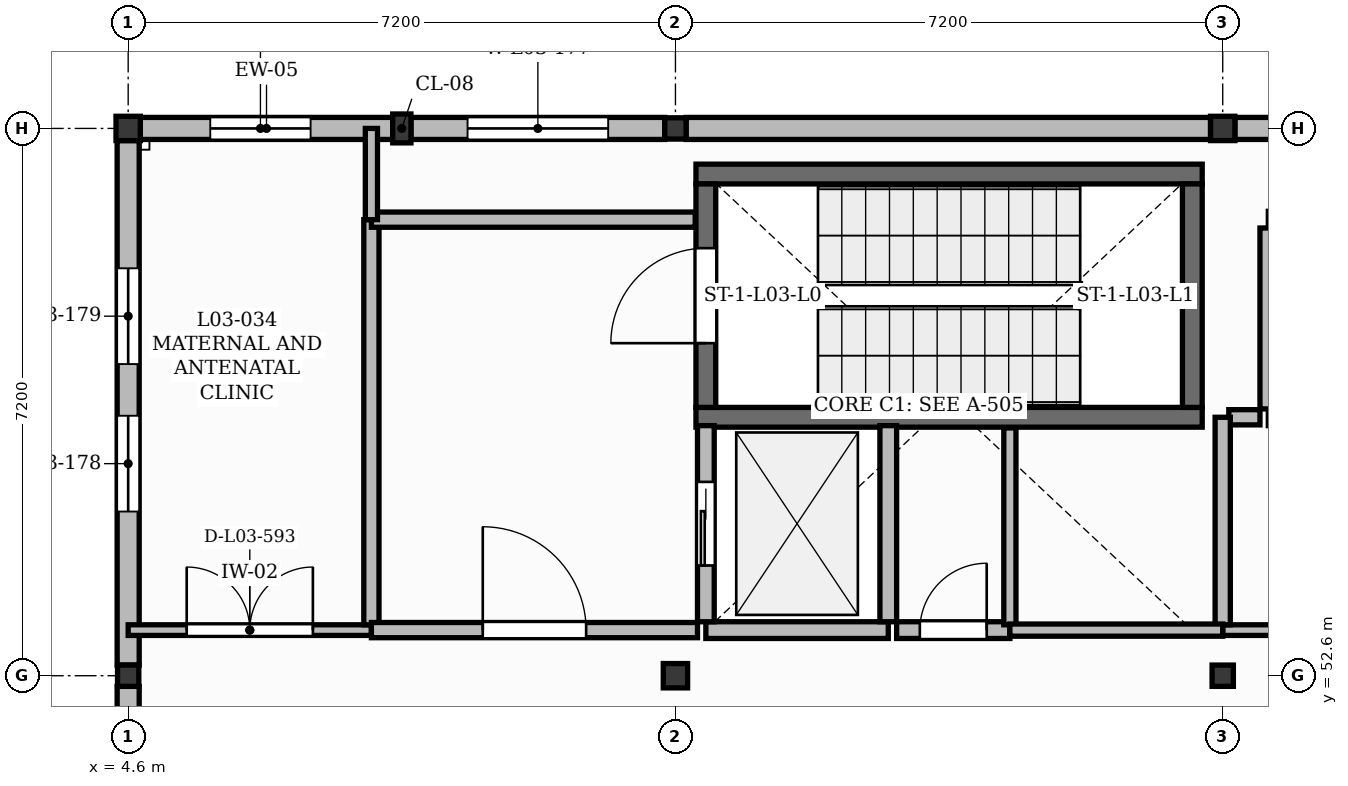
"""IFC4 building model, lengths in metres.
Left out: names, types, materials, properties, quantities, classifications, styles, units other than length and angle.
Written with IfcOpenShell. Run it as: python <this file> out.ifc"""

import sys

from ifc_helpers import new_model, si_unit, direction, frame, frame_2d, origin, origin_2d, place, context, subcontext, project, spatial, rectangle, extrude, element, fill, save


model = new_model("IFC4")
c1 = context("Model", 3, precision=1e-05, world=origin(), true_north=direction((0.0, 1.0)))
c2 = subcontext(c1, "Body", "Model", "MODEL_VIEW")
j1 = project(units=[si_unit("LENGTHUNIT", "METRE"), si_unit("PLANEANGLEUNIT", "RADIAN")], contexts=[c1])
p1 = place(None, origin())
s1 = spatial("IfcSite", under=j1, at=p1, CompositionType="ELEMENT")
p2 = place(p1, origin())
s2 = spatial("IfcBuilding", under=s1, at=p2, CompositionType="ELEMENT")
p3 = place(p2, frame((0.0, 0.0, 13.2)))
s3 = spatial("IfcBuildingStorey", under=s2, at=p3, CompositionType="ELEMENT", Elevation=13.2)
p4 = place(p3, frame((4.6, 52.6, 0.0), z_axis=(0.0, 0.0, 1.0), x_axis=(1.0, 0.0, 0.0)))
e1 = element("IfcColumn", 1, at=p4, inside=s3, PredefinedType="COLUMN", context=c2, shape_type="SweptSolid", body=[
    extrude(rectangle(XDim=0.28, YDim=0.28, at=origin_2d()), origin(), (0.0, 0.0, 1.0), 4.01),
])
for number, where, z_axis, x_axis in (
    (2, (4.6, 59.8, 0.0), (0.0, 0.0, 1.0), (1.0, 0.0, 0.0)),
    (3, (11.8, 52.6, 0.0), (0.0, 0.0, 1.0), (1.0, 0.0, 0.0)),
):
    element("IfcColumn", number, at=place(p3, frame(where, z_axis=z_axis, x_axis=x_axis)), inside=s3, PredefinedType="COLUMN", context=c2, shape_type="SweptSolid", body=[
        extrude(rectangle(XDim=0.32, YDim=0.32, at=origin_2d()), origin(), (0.0, 0.0, 1.0), 4.01),
    ])
for number, where, z_axis, x_axis in (
    (4, (11.8, 59.8, 0.0), (0.0, 0.0, 1.0), (1.0, 0.0, 0.0)),
    (5, (19.0, 52.6, 0.0), (0.0, 0.0, 1.0), (1.0, 0.0, 0.0)),
):
    element("IfcColumn", number, at=place(p3, frame(where, z_axis=z_axis, x_axis=x_axis)), inside=s3, PredefinedType="COLUMN", context=c2, shape_type="SweptSolid", body=[
        extrude(rectangle(XDim=0.28, YDim=0.28, at=origin_2d()), origin(), (0.0, 0.0, 1.0), 4.01),
    ])
p5 = place(p3, frame((19.0, 59.8, 0.0), z_axis=(0.0, 0.0, 1.0), x_axis=(1.0, 0.0, 0.0)))
e6 = element("IfcColumn", 6, at=p5, inside=s3, PredefinedType="COLUMN", context=c2, shape_type="SweptSolid", body=[
    extrude(rectangle(XDim=0.32, YDim=0.32, at=origin_2d()), origin(), (0.0, 0.0, 1.0), 4.01),
])
p6 = place(p3, frame((8.2, 59.8, 0.0), z_axis=(0.0, 0.0, 1.0), x_axis=(1.0, 0.0, 0.0)))
e7 = element("IfcColumn", 7, at=p6, inside=s3, PredefinedType="PILASTER", context=c2, shape_type="SweptSolid", body=[
    extrude(rectangle(XDim=0.24, YDim=0.38, at=origin_2d()), origin(), (0.0, 0.0, 1.0), 4.01),
])
p7 = place(p3, frame((4.6, 45.56, 0.0), z_axis=(0.0, 0.0, 1.0), x_axis=(0.0, 1.0, 0.0)))
e8 = element("IfcWall", 8, at=p7, inside=s3, PredefinedType="SOLIDWALL", context=c2, shape_type="SweptSolid", body=[
    extrude(rectangle(XDim=6.9, YDim=0.29, at=frame_2d((3.45, 0.0))), origin(), (0.0, 0.0, 1.0), 3.52),
])
p8 = place(p7, frame((1.61, 0.0, 1.0)))
e9 = element("IfcOpeningElement", 9, at=p8, cuts=e8, PredefinedType="OPENING", context=c2, shape_type="SweptSolid", body=[
    extrude(rectangle(XDim=1.94, YDim=1.8, at=frame_2d((0.97, 0.9))), frame((0.0, 0.155, 0.0), z_axis=(0.0, -1.0, 0.0), x_axis=(1.0, 0.0, 0.0)), (0.0, 0.0, 1.0), 0.31),
])
p9 = place(p3, frame((4.76, 59.8, 0.0), z_axis=(0.0, 0.0, 1.0), x_axis=(1.0, 0.0, 0.0)))
e10 = element("IfcWall", 10, at=p9, inside=s3, PredefinedType="SOLIDWALL", context=c2, shape_type="SweptSolid", body=[
    extrude(rectangle(XDim=3.32, YDim=0.29, at=frame_2d((1.66, 0.0))), origin(), (0.0, 0.0, 1.0), 3.55),
])
p10 = place(p9, frame((0.92, 0.0, 1.5)))
e11 = element("IfcOpeningElement", 11, at=p10, cuts=e10, PredefinedType="OPENING", context=c2, shape_type="SweptSolid", body=[
    extrude(rectangle(XDim=1.32, YDim=1.25, at=frame_2d((0.66, 0.625))), frame((0.0, 0.155, 0.0), z_axis=(0.0, -1.0, 0.0), x_axis=(1.0, 0.0, 0.0)), (0.0, 0.0, 1.0), 0.31),
])
p11 = place(p3, frame((8.32, 59.8, 0.0), z_axis=(0.0, 0.0, 1.0), x_axis=(1.0, 0.0, 0.0)))
e12 = element("IfcWall", 12, at=p11, inside=s3, PredefinedType="SOLIDWALL", context=c2, shape_type="SweptSolid", body=[
    extrude(rectangle(XDim=3.34, YDim=0.29, at=frame_2d((1.67, 0.0))), origin(), (0.0, 0.0, 1.0), 3.55),
])
p12 = place(p11, frame((0.745, 0.0, 1.5)))
e13 = element("IfcOpeningElement", 13, at=p12, cuts=e12, PredefinedType="OPENING", context=c2, shape_type="SweptSolid", body=[
    extrude(rectangle(XDim=1.85, YDim=1.25, at=frame_2d((0.925, 0.625))), frame((0.0, 0.155, 0.0), z_axis=(0.0, -1.0, 0.0), x_axis=(1.0, 0.0, 0.0)), (0.0, 0.0, 1.0), 0.31),
])
p13 = place(p3, frame((4.6, 52.74, 0.0), z_axis=(0.0, 0.0, 1.0), x_axis=(0.0, 1.0, 0.0)))
e14 = element("IfcWall", 14, at=p13, inside=s3, PredefinedType="SOLIDWALL", context=c2, shape_type="SweptSolid", body=[
    extrude(rectangle(XDim=6.9, YDim=0.29, at=frame_2d((3.45, 0.0))), origin(), (0.0, 0.0, 1.0), 3.55),
])
p14 = place(p13, frame((2.02, 0.0, 1.05)))
e15 = element("IfcOpeningElement", 15, at=p14, cuts=e14, PredefinedType="OPENING", context=c2, shape_type="SweptSolid", body=[
    extrude(rectangle(XDim=1.26, YDim=1.65, at=frame_2d((0.63, 0.825))), frame((0.0, 0.155, 0.0), z_axis=(0.0, -1.0, 0.0), x_axis=(1.0, 0.0, 0.0)), (0.0, 0.0, 1.0), 0.31),
])
p15 = place(p13, frame((3.96, 0.0, 1.05)))
e16 = element("IfcOpeningElement", 16, at=p15, cuts=e14, PredefinedType="OPENING", context=c2, shape_type="SweptSolid", body=[
    extrude(rectangle(XDim=1.26, YDim=1.65, at=frame_2d((0.63, 0.825))), frame((0.0, 0.155, 0.0), z_axis=(0.0, -1.0, 0.0), x_axis=(1.0, 0.0, 0.0)), (0.0, 0.0, 1.0), 0.31),
])
p16 = place(p3, frame((11.94, 59.8, 0.0), z_axis=(0.0, 0.0, 1.0), x_axis=(1.0, 0.0, 0.0)))
e17 = element("IfcWall", 17, at=p16, inside=s3, PredefinedType="SOLIDWALL", context=c2, shape_type="SweptSolid", body=[
    extrude(rectangle(XDim=6.9, YDim=0.29, at=frame_2d((3.45, 0.0))), origin(), (0.0, 0.0, 1.0), 3.55),
])
p17 = place(p3, frame((19.16, 59.8, 0.0), z_axis=(0.0, 0.0, 1.0), x_axis=(1.0, 0.0, 0.0)))
e18 = element("IfcWall", 18, at=p17, inside=s3, PredefinedType="SOLIDWALL", context=c2, shape_type="SweptSolid", body=[
    extrude(rectangle(XDim=3.32, YDim=0.29, at=frame_2d((1.66, 0.0))), origin(), (0.0, 0.0, 1.0), 3.55),
])
p18 = place(p17, frame((0.78, 0.0, 1.0)))
e19 = element("IfcOpeningElement", 19, at=p18, cuts=e18, PredefinedType="OPENING", context=c2, shape_type="SweptSolid", body=[
    extrude(rectangle(XDim=1.2, YDim=1.95, at=frame_2d((0.6, 0.975))), frame((0.0, 0.155, 0.0), z_axis=(0.0, -1.0, 0.0), x_axis=(1.0, 0.0, 0.0)), (0.0, 0.0, 1.0), 0.31),
])
for number, where, z_axis, x_axis in (
    (20, (12.07, 56.0, 0.0), (0.0, 0.0, 1.0), (1.0, 0.0, 0.0)),
    (21, (12.07, 59.2, 0.0), (0.0, 0.0, 1.0), (1.0, 0.0, 0.0)),
):
    element("IfcWall", number, at=place(p3, frame(where, z_axis=z_axis, x_axis=x_axis)), inside=s3, PredefinedType="SHEAR", context=c2, shape_type="SweptSolid", body=[
        extrude(rectangle(XDim=6.66, YDim=0.26, at=frame_2d((3.33, 0.0))), origin(), (0.0, 0.0, 1.0), 3.95),
    ])
p19 = place(p3, frame((12.2, 56.13, 0.0), z_axis=(0.0, 0.0, 1.0), x_axis=(0.0, 1.0, 0.0)))
e22 = element("IfcWall", 22, at=p19, inside=s3, PredefinedType="SHEAR", context=c2, shape_type="SweptSolid", body=[
    extrude(rectangle(XDim=2.94, YDim=0.26, at=frame_2d((1.47, 0.0))), origin(), (0.0, 0.0, 1.0), 3.95),
])
p20 = place(p19, frame((0.845, 0.0, 0.0)))
e23 = element("IfcOpeningElement", 23, at=p20, cuts=e22, PredefinedType="OPENING", context=c2, shape_type="SweptSolid", body=[
    extrude(rectangle(XDim=1.25, YDim=2.15, at=frame_2d((0.625, 1.075))), frame((0.0, 0.14, 0.0), z_axis=(0.0, -1.0, 0.0), x_axis=(1.0, 0.0, 0.0)), (0.0, 0.0, 1.0), 0.28),
])
p21 = place(p3, frame((18.6, 56.13, 0.0), z_axis=(0.0, 0.0, 1.0), x_axis=(0.0, 1.0, 0.0)))
e24 = element("IfcWall", 24, at=p21, inside=s3, PredefinedType="SHEAR", context=c2, shape_type="SweptSolid", body=[
    extrude(rectangle(XDim=2.94, YDim=0.26, at=frame_2d((1.47, 0.0))), origin(), (0.0, 0.0, 1.0), 3.95),
])
p22 = place(p3, frame((12.2, 53.2, 0.0), z_axis=(0.0, 0.0, 1.0), x_axis=(1.0, 0.0, 0.0)))
e25 = element("IfcWall", 25, at=p22, inside=s3, PredefinedType="SOLIDWALL", context=c2, shape_type="SweptSolid", body=[
    extrude(rectangle(XDim=2.4, YDim=0.22, at=frame_2d((1.2, 0.0))), origin(), (0.0, 0.0, 1.0), 3.95),
])
p23 = place(p3, frame((12.2, 53.31, 0.0), z_axis=(0.0, 0.0, 1.0), x_axis=(0.0, 1.0, 0.0)))
e26 = element("IfcWall", 26, at=p23, inside=s3, PredefinedType="SOLIDWALL", context=c2, shape_type="SweptSolid", body=[
    extrude(rectangle(XDim=2.58, YDim=0.22, at=frame_2d((1.29, 0.0))), origin(), (0.0, 0.0, 1.0), 3.95),
])
p24 = place(p23, frame((0.74, 0.0, 0.0)))
e27 = element("IfcOpeningElement", 27, at=p24, cuts=e26, PredefinedType="OPENING", context=c2, shape_type="SweptSolid", body=[
    extrude(rectangle(XDim=1.1, YDim=2.15, at=frame_2d((0.55, 1.075))), frame((0.0, 0.12, 0.0), z_axis=(0.0, -1.0, 0.0), x_axis=(1.0, 0.0, 0.0)), (0.0, 0.0, 1.0), 0.24),
])
p25 = place(p3, frame((14.6, 53.31, 0.0), z_axis=(0.0, 0.0, 1.0), x_axis=(0.0, 1.0, 0.0)))
e28 = element("IfcWall", 28, at=p25, inside=s3, PredefinedType="SOLIDWALL", context=c2, shape_type="SweptSolid", body=[
    extrude(rectangle(XDim=2.58, YDim=0.22, at=frame_2d((1.29, 0.0))), origin(), (0.0, 0.0, 1.0), 3.95),
])
p26 = place(p3, frame((19.6, 56.11, 0.0), z_axis=(0.0, 0.0, 1.0), x_axis=(0.0, 1.0, 0.0)))
e29 = element("IfcWall", 29, at=p26, inside=s3, PredefinedType="SOLIDWALL", context=c2, shape_type="SweptSolid", body=[
    extrude(rectangle(XDim=2.38, YDim=0.22, at=frame_2d((1.19, 0.0))), origin(), (0.0, 0.0, 1.0), 3.95),
])
p27 = place(p3, frame((4.6, 53.2, 0.0), z_axis=(0.0, 0.0, 1.0), x_axis=(1.0, 0.0, 0.0)))
e30 = element("IfcWall", 30, at=p27, inside=s3, PredefinedType="PARTITIONING", context=c2, shape_type="SweptSolid", body=[
    extrude(rectangle(XDim=3.2, YDim=0.14, at=frame_2d((1.6, 0.0))), origin(), (0.0, 0.0, 1.0), 3.96),
])
p28 = place(p27, frame((0.77, 0.0, 0.0)))
e31 = element("IfcOpeningElement", 31, at=p28, cuts=e30, PredefinedType="OPENING", context=c2, shape_type="SweptSolid", body=[
    extrude(rectangle(XDim=1.66, YDim=2.3, at=frame_2d((0.83, 1.15))), frame((0.0, 0.08, 0.0), z_axis=(0.0, -1.0, 0.0), x_axis=(1.0, 0.0, 0.0)), (0.0, 0.0, 1.0), 0.16),
])
p29 = place(p3, frame((7.8, 53.27, 0.0), z_axis=(0.0, 0.0, 1.0), x_axis=(0.0, 1.0, 0.0)))
e32 = element("IfcWall", 32, at=p29, inside=s3, PredefinedType="PARTITIONING", context=c2, shape_type="SweptSolid", body=[
    extrude(rectangle(XDim=5.33, YDim=0.2, at=frame_2d((2.665, 0.0))), origin(), (0.0, 0.0, 1.0), 3.96),
])
p30 = place(p3, frame((7.8, 53.2, 0.0), z_axis=(0.0, 0.0, 1.0), x_axis=(1.0, 0.0, 0.0)))
e33 = element("IfcWall", 33, at=p30, inside=s3, PredefinedType="PARTITIONING", context=c2, shape_type="SweptSolid", body=[
    extrude(rectangle(XDim=4.29, YDim=0.2, at=frame_2d((2.145, 0.0))), origin(), (0.0, 0.0, 1.0), 3.96),
])
p31 = place(p30, frame((1.465, 0.0, 0.0)))
e34 = element("IfcOpeningElement", 34, at=p31, cuts=e33, PredefinedType="OPENING", context=c2, shape_type="SweptSolid", body=[
    extrude(rectangle(XDim=1.36, YDim=2.2, at=frame_2d((0.68, 1.1))), frame((0.0, 0.11, 0.0), z_axis=(0.0, -1.0, 0.0), x_axis=(1.0, 0.0, 0.0)), (0.0, 0.0, 1.0), 0.22),
])
p32 = place(p3, frame((14.71, 53.2, 0.0), z_axis=(0.0, 0.0, 1.0), x_axis=(1.0, 0.0, 0.0)))
e35 = element("IfcWall", 35, at=p32, inside=s3, PredefinedType="SOLIDWALL", context=c2, shape_type="SweptSolid", body=[
    extrude(rectangle(XDim=1.49, YDim=0.22, at=frame_2d((0.745, 0.0))), origin(), (0.0, 0.0, 1.0), 3.96),
])
p33 = place(p32, frame((0.305, 0.0, 0.0)))
e36 = element("IfcOpeningElement", 36, at=p33, cuts=e35, PredefinedType="OPENING", context=c2, shape_type="SweptSolid", body=[
    extrude(rectangle(XDim=0.88, YDim=2.05, at=frame_2d((0.44, 1.025))), frame((0.0, 0.12, 0.0), z_axis=(0.0, -1.0, 0.0), x_axis=(1.0, 0.0, 0.0)), (0.0, 0.0, 1.0), 0.24),
])
p34 = place(p3, frame((19.0, 53.2, 0.0), z_axis=(0.0, 0.0, 1.0), x_axis=(1.0, 0.0, 0.0)))
e37 = element("IfcWall", 37, at=p34, inside=s3, PredefinedType="PARTITIONING", context=c2, shape_type="SweptSolid", body=[
    extrude(rectangle(XDim=5.4, YDim=0.14, at=frame_2d((2.7, 0.0))), origin(), (0.0, 0.0, 1.0), 3.96),
])
p35 = place(p34, frame((2.09, 0.0, 0.0)))
e38 = element("IfcOpeningElement", 38, at=p35, cuts=e37, PredefinedType="OPENING", context=c2, shape_type="SweptSolid", body=[
    extrude(rectangle(XDim=1.22, YDim=2.1, at=frame_2d((0.61, 1.05))), frame((0.0, 0.08, 0.0), z_axis=(0.0, -1.0, 0.0), x_axis=(1.0, 0.0, 0.0)), (0.0, 0.0, 1.0), 0.16),
])
p36 = place(p34, frame((3.545, 0.0, 0.0)))
e39 = element("IfcOpeningElement", 39, at=p36, cuts=e37, PredefinedType="OPENING", context=c2, shape_type="SweptSolid", body=[
    extrude(rectangle(XDim=0.95, YDim=2.1, at=frame_2d((0.475, 1.05))), frame((0.0, 0.08, 0.0), z_axis=(0.0, -1.0, 0.0), x_axis=(1.0, 0.0, 0.0)), (0.0, 0.0, 1.0), 0.16),
])
p37 = place(p3, frame((16.2, 53.27, 0.0), z_axis=(0.0, 0.0, 1.0), x_axis=(0.0, 1.0, 0.0)))
e40 = element("IfcWall", 40, at=p37, inside=s3, PredefinedType="PARTITIONING", context=c2, shape_type="SweptSolid", body=[
    extrude(rectangle(XDim=2.59, YDim=0.16, at=frame_2d((1.295, 0.0))), origin(), (0.0, 0.0, 1.0), 3.96),
])
p38 = place(p3, frame((12.06, 58.6, 0.0), z_axis=(0.0, 0.0, 1.0), x_axis=(-1.0, 0.0, 0.0)))
e41 = element("IfcWall", 41, at=p38, inside=s3, PredefinedType="PARTITIONING", context=c2, shape_type="SweptSolid", body=[
    extrude(rectangle(XDim=4.26, YDim=0.2, at=frame_2d((2.13, 0.0))), origin(), (0.0, 0.0, 1.0), 3.96),
])
p39 = place(p3, frame((19.49, 56.0, 0.0), z_axis=(0.0, 0.0, 1.0), x_axis=(-1.0, 0.0, 0.0)))
e42 = element("IfcWall", 42, at=p39, inside=s3, PredefinedType="PARTITIONING", context=c2, shape_type="SweptSolid", body=[
    extrude(rectangle(XDim=0.41, YDim=0.2, at=frame_2d((0.205, 0.0))), origin(), (0.0, 0.0, 1.0), 3.96),
])
p40 = place(p3, frame((19.0, 53.27, 0.0), z_axis=(0.0, 0.0, 1.0), x_axis=(0.0, 1.0, 0.0)))
e43 = element("IfcWall", 43, at=p40, inside=s3, PredefinedType="PARTITIONING", context=c2, shape_type="SweptSolid", body=[
    extrude(rectangle(XDim=2.73, YDim=0.2, at=frame_2d((1.365, 0.0))), origin(), (0.0, 0.0, 1.0), 3.49),
])
p41 = place(p3, frame((19.0, 53.2, 0.0), z_axis=(0.0, 0.0, 1.0), x_axis=(-1.0, 0.0, 0.0)))
e44 = element("IfcWall", 44, at=p41, inside=s3, PredefinedType="PARTITIONING", context=c2, shape_type="SweptSolid", body=[
    extrude(rectangle(XDim=2.8, YDim=0.16, at=frame_2d((1.4, 0.0))), origin(), (0.0, 0.0, 1.0), 3.96),
])
p42 = place(p3, frame((7.8, 58.6, 0.0), z_axis=(0.0, 0.0, 1.0), x_axis=(0.0, 1.0, 0.0)))
e45 = element("IfcWall", 45, at=p42, inside=s3, PredefinedType="PARTITIONING", context=c2, shape_type="SweptSolid", body=[
    extrude(rectangle(XDim=1.2, YDim=0.16, at=frame_2d((0.6, 0.0))), origin(), (0.0, 0.0, 1.0), 3.96),
])
p43 = place(p10, origin())
e46 = element("IfcWindow", 46, at=p43, inside=s3, PartitioningType="SINGLE_PANEL", PredefinedType="WINDOW", context=c2, shape_type="SweptSolid", body=[
    extrude(rectangle(XDim=1.32, YDim=1.25, at=frame_2d((0.66, 0.625))), frame((0.0, 0.03, 0.0), z_axis=(0.0, -1.0, 0.0), x_axis=(1.0, 0.0, 0.0)), (0.0, 0.0, 1.0), 0.06),
])
fill(e11, e46)
p44 = place(p12, origin())
e47 = element("IfcWindow", 47, at=p44, inside=s3, PartitioningType="DOUBLE_PANEL_VERTICAL", PredefinedType="WINDOW", context=c2, shape_type="SweptSolid", body=[
    extrude(rectangle(XDim=1.85, YDim=1.25, at=frame_2d((0.925, 0.625))), frame((0.0, 0.03, 0.0), z_axis=(0.0, -1.0, 0.0), x_axis=(1.0, 0.0, 0.0)), (0.0, 0.0, 1.0), 0.06),
])
fill(e13, e47)
p45 = place(p14, origin())
e48 = element("IfcWindow", 48, at=p45, inside=s3, PartitioningType="SINGLE_PANEL", PredefinedType="WINDOW", context=c2, shape_type="SweptSolid", body=[
    extrude(rectangle(XDim=1.26, YDim=1.65, at=frame_2d((0.63, 0.825))), frame((0.0, 0.03, 0.0), z_axis=(0.0, -1.0, 0.0), x_axis=(1.0, 0.0, 0.0)), (0.0, 0.0, 1.0), 0.06),
])
fill(e15, e48)
p46 = place(p15, origin())
e49 = element("IfcWindow", 49, at=p46, inside=s3, PartitioningType="SINGLE_PANEL", PredefinedType="WINDOW", context=c2, shape_type="SweptSolid", body=[
    extrude(rectangle(XDim=1.26, YDim=1.65, at=frame_2d((0.63, 0.825))), frame((0.0, 0.03, 0.0), z_axis=(0.0, -1.0, 0.0), x_axis=(1.0, 0.0, 0.0)), (0.0, 0.0, 1.0), 0.06),
])
fill(e16, e49)
p47 = place(p24, origin())
e50 = element("IfcDoor", 50, at=p47, inside=s3, OperationType="SLIDING_TO_LEFT", PredefinedType="DOOR", context=c2, shape_type="SweptSolid", body=[
    extrude(rectangle(XDim=1.1, YDim=2.15, at=frame_2d((0.55, 1.075))), frame((0.0, 0.025, 0.0), z_axis=(0.0, -1.0, 0.0), x_axis=(1.0, 0.0, 0.0)), (0.0, 0.0, 1.0), 0.05),
])
fill(e27, e50)
p48 = place(p20, origin())
e51 = element("IfcDoor", 51, at=p48, inside=s3, OperationType="SINGLE_SWING_LEFT", PredefinedType="DOOR", context=c2, shape_type="SweptSolid", body=[
    extrude(rectangle(XDim=1.25, YDim=2.15, at=frame_2d((0.625, 1.075))), frame((0.0, 0.025, 0.0), z_axis=(0.0, -1.0, 0.0), x_axis=(1.0, 0.0, 0.0)), (0.0, 0.0, 1.0), 0.05),
])
fill(e23, e51)
p49 = place(p31, origin())
e52 = element("IfcDoor", 52, at=p49, inside=s3, OperationType="SINGLE_SWING_LEFT", PredefinedType="DOOR", context=c2, shape_type="SweptSolid", body=[
    extrude(rectangle(XDim=1.36, YDim=2.2, at=frame_2d((0.68, 1.1))), frame((0.0, 0.025, 0.0), z_axis=(0.0, -1.0, 0.0), x_axis=(1.0, 0.0, 0.0)), (0.0, 0.0, 1.0), 0.05),
])
fill(e34, e52)
p50 = place(p33, origin())
e53 = element("IfcDoor", 53, at=p50, inside=s3, OperationType="SINGLE_SWING_RIGHT", PredefinedType="DOOR", context=c2, shape_type="SweptSolid", body=[
    extrude(rectangle(XDim=0.88, YDim=2.05, at=frame_2d((0.44, 1.025))), frame((0.0, 0.025, 0.0), z_axis=(0.0, -1.0, 0.0), x_axis=(1.0, 0.0, 0.0)), (0.0, 0.0, 1.0), 0.05),
])
fill(e36, e53)
p51 = place(p28, origin())
e54 = element("IfcDoor", 54, at=p51, inside=s3, OperationType="DOUBLE_DOOR_SINGLE_SWING", PredefinedType="DOOR", context=c2, shape_type="SweptSolid", body=[
    extrude(rectangle(XDim=1.66, YDim=2.3, at=frame_2d((0.83, 1.15))), frame((0.0, 0.025, 0.0), z_axis=(0.0, -1.0, 0.0), x_axis=(1.0, 0.0, 0.0)), (0.0, 0.0, 1.0), 0.05),
])
fill(e31, e54)
save(model, sys.argv[1])
